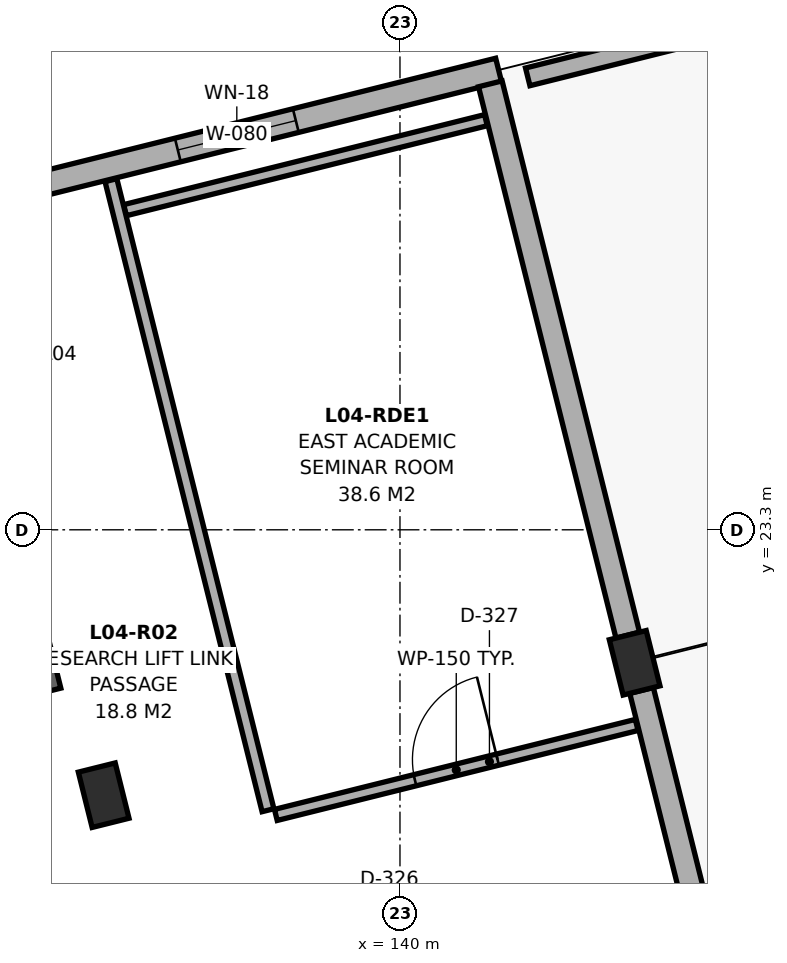
"""IFC4 building model, lengths in metres.
Left out: names, types, materials, properties, quantities, classifications, styles, units other than length and angle.
Written with IfcOpenShell. Run it as: python <this file> out.ifc"""

import sys

from ifc_helpers import new_model, si_unit, direction, frame, frame_2d, origin, origin_2d, place, context, subcontext, project, spatial, rectangle, extrude, element, fill, save


model = new_model("IFC4")
c1 = context("Model", 3, precision=1e-05, world=origin(), true_north=direction((0.0, 1.0)))
c2 = subcontext(c1, "Body", "Model", "MODEL_VIEW")
j1 = project(units=[si_unit("LENGTHUNIT", "METRE"), si_unit("PLANEANGLEUNIT", "RADIAN")], contexts=[c1])
p1 = place(None, origin())
s1 = spatial("IfcSite", under=j1, at=p1, CompositionType="ELEMENT")
p2 = place(p1, origin())
s2 = spatial("IfcBuilding", under=s1, at=p2, CompositionType="ELEMENT")
p3 = place(p2, frame((0.0, 0.0, 17.5)))
s3 = spatial("IfcBuildingStorey", under=s2, at=p3, CompositionType="ELEMENT", Elevation=17.5)
for number, where, z_axis, x_axis in (
    (1, (136.102, 19.808, 0.0), (0.0, 0.0, 1.0), (0.97, 0.242, 0.0)),
    (2, (143.088, 21.55, 0.0), (0.0, 0.0, 1.0), (0.97, 0.242, 0.0)),
):
    element("IfcColumn", number, at=place(p3, frame(where, z_axis=z_axis, x_axis=x_axis)), inside=s3, PredefinedType="COLUMN", context=c2, shape_type="SweptSolid", body=[
        extrude(rectangle(XDim=0.5, YDim=0.75, at=origin_2d()), origin(), (0.0, 0.0, 1.0), 3.72),
    ])
p4 = place(p3, frame((134.409, 27.631, 0.0), z_axis=(0.0, 0.0, 1.0), x_axis=(0.97030006528, 0.241904492141, 0.0)))
e3 = element("IfcWall", 3, at=p4, inside=s3, PredefinedType="SOLIDWALL", context=c2, shape_type="SweptSolid", body=[
    extrude(rectangle(XDim=7.1, YDim=0.32, at=frame_2d((3.55, 0.0))), origin(), (0.0, 0.0, 1.0), 3.005),
])
p5 = place(p4, frame((2.75, 0.0, 0.9)))
e4 = element("IfcOpeningElement", 4, at=p5, cuts=e3, PredefinedType="OPENING", context=c2, shape_type="SweptSolid", body=[
    extrude(rectangle(XDim=1.6, YDim=1.5, at=frame_2d((0.8, 0.75))), frame((0.0, 0.172, 0.0), z_axis=(0.0, -1.0, 0.0), x_axis=(1.0, 0.0, 0.0)), (0.0, 0.0, 1.0), 0.344),
])
p6 = place(p3, frame((141.188, 29.167, 0.0), z_axis=(0.0, 0.0, 1.0), x_axis=(0.24192077913, -0.970296004643, 0.0)))
e5 = element("IfcWall", 5, at=p6, inside=s3, PredefinedType="SOLIDWALL", context=c2, shape_type="SweptSolid", body=[
    extrude(rectangle(XDim=7.475, YDim=0.32, at=frame_2d((3.737, 0.0))), origin(), (0.0, 0.0, 1.0), 3.055),
])
p7 = place(p3, frame((143.178, 21.186, 0.0), z_axis=(0.0, 0.0, 1.0), x_axis=(0.241925454579, -0.970294838916, 0.0)))
e6 = element("IfcWall", 6, at=p7, inside=s3, PredefinedType="SOLIDWALL", context=c2, shape_type="SweptSolid", body=[
    extrude(rectangle(XDim=7.25, YDim=0.32, at=frame_2d((3.625, 0.0))), origin(), (0.0, 0.0, 1.0), 3.005),
])
p8 = place(p3, frame((141.681, 29.259, -0.08), z_axis=(0.0, 0.0, 1.0), x_axis=(0.970301600071, 0.241898335878, 0.0)))
e7 = element("IfcWall", 7, at=p8, inside=s3, PredefinedType="PARAPET", context=c2, shape_type="SweptSolid", body=[
    extrude(rectangle(XDim=6.22, YDim=0.24, at=frame_2d((3.11, 0.0))), origin(), (0.0, 0.0, 1.0), 0.6),
])
p9 = place(p3, frame((135.402, 21.183, 0.0), z_axis=(0.0, 0.0, 1.0), x_axis=(-0.241921647353, 0.970295788171, 0.0)))
e8 = element("IfcWall", 8, at=p9, inside=s3, PredefinedType="SHEAR", context=c2, shape_type="SweptSolid", body=[
    extrude(rectangle(XDim=2.994, YDim=0.28, at=frame_2d((1.497, 0.0))), origin(), (0.0, 0.0, 1.0), 3.72),
])
p10 = place(p3, frame((138.367, 19.549, 0.0), z_axis=(0.0, 0.0, 1.0), x_axis=(0.970289077222, 0.241948561938, 0.0)))
e9 = element("IfcWall", 9, at=p10, inside=s3, PredefinedType="PARTITIONING", context=c2, shape_type="SweptSolid", body=[
    extrude(rectangle(XDim=4.893, YDim=0.15, at=frame_2d((2.446, 0.0))), origin(), (0.0, 0.0, 1.0), 3.005),
])
p11 = place(p10, frame((1.886, 0.0, 0.0)))
e10 = element("IfcOpeningElement", 10, at=p11, cuts=e9, PredefinedType="OPENING", context=c2, shape_type="SweptSolid", body=[
    extrude(rectangle(XDim=1.12, YDim=2.2, at=frame_2d((0.56, 1.1))), frame((0.0, 0.087, 0.0), z_axis=(0.0, -1.0, 0.0), x_axis=(1.0, 0.0, 0.0)), (0.0, 0.0, 1.0), 0.174),
])
p12 = place(p3, frame((136.383, 27.505, 0.0), z_axis=(0.0, 0.0, 1.0), x_axis=(0.970303709543, 0.241889874215, 0.0)))
e11 = element("IfcWall", 11, at=p12, inside=s3, PredefinedType="PARTITIONING", context=c2, shape_type="SweptSolid", body=[
    extrude(rectangle(XDim=4.893, YDim=0.15, at=frame_2d((2.447, 0.0))), origin(), (0.0, 0.0, 1.0), 3.7),
])
p13 = place(p3, frame((138.264, 19.611, 0.0), z_axis=(0.0, 0.0, 1.0), x_axis=(-0.241937132378, 0.970291927193, 0.0)))
e12 = element("IfcWall", 12, at=p13, inside=s3, PredefinedType="PARTITIONING", context=c2, shape_type="SweptSolid", body=[
    extrude(rectangle(XDim=8.543, YDim=0.16, at=frame_2d((4.271, 0.0))), origin(), (0.0, 0.0, 1.0), 3.055),
])
p14 = place(p5, origin())
e13 = element("IfcWindow", 13, at=p14, inside=s3, PartitioningType="DOUBLE_PANEL_VERTICAL", PredefinedType="WINDOW", context=c2, shape_type="SweptSolid", body=[
    extrude(rectangle(XDim=1.6, YDim=1.5, at=frame_2d((0.8, 0.75))), frame((0.0, 0.03, 0.0), z_axis=(0.0, -1.0, 0.0), x_axis=(1.0, 0.0, 0.0)), (0.0, 0.0, 1.0), 0.06),
])
fill(e4, e13)
p15 = place(p11, origin())
e14 = element("IfcDoor", 14, at=p15, inside=s3, OperationType="SINGLE_SWING_RIGHT", PredefinedType="DOOR", context=c2, shape_type="SweptSolid", body=[
    extrude(rectangle(XDim=1.12, YDim=2.2, at=frame_2d((0.56, 1.1))), frame((0.0, 0.025, 0.0), z_axis=(0.0, -1.0, 0.0), x_axis=(1.0, 0.0, 0.0)), (0.0, 0.0, 1.0), 0.05),
])
fill(e10, e14)
save(model, sys.argv[1])
